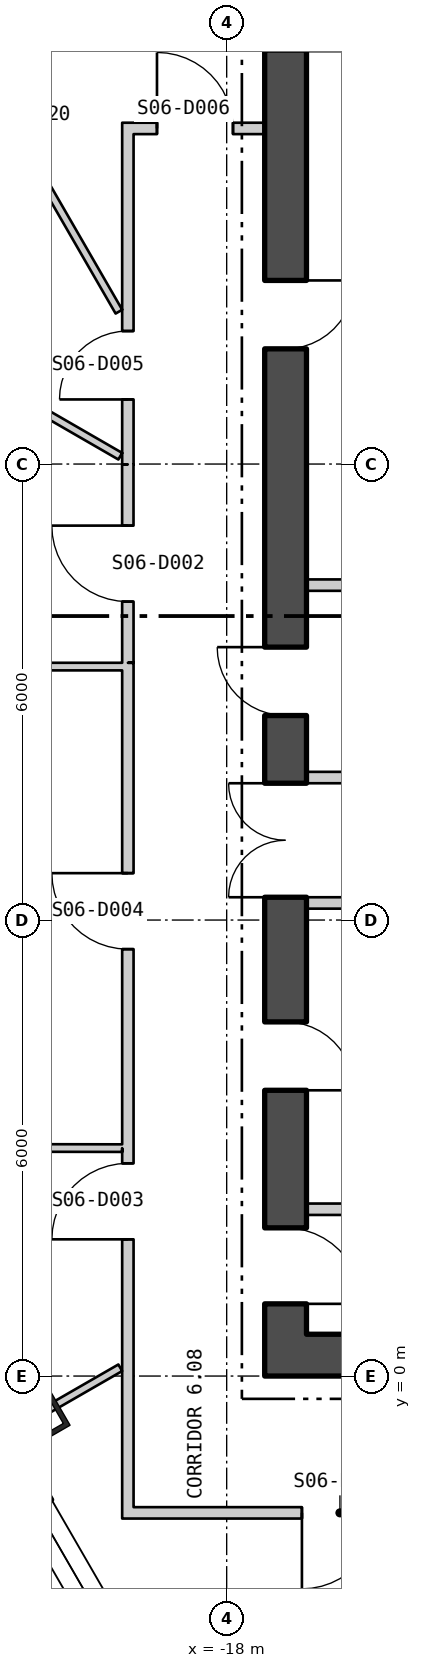
"""IFC4 building model, lengths in metres.
Left out: names, types, materials, properties, quantities, classifications, styles, units other than length and angle.
Written with IfcOpenShell. Run it as: python <this file> out.ifc"""

import sys

from ifc_helpers import new_model, si_unit, direction, frame, frame_2d, origin, origin_2d, place, context, subcontext, project, spatial, polyline, rectangle, hollow_rectangle, outline, extrude, element, fill, save


model = new_model("IFC4")
c1 = context("Model", 3, precision=1e-05, world=origin(), true_north=direction((0.0, 1.0)))
c2 = subcontext(c1, "Body", "Model", "MODEL_VIEW")
j1 = project(units=[si_unit("LENGTHUNIT", "METRE"), si_unit("PLANEANGLEUNIT", "RADIAN")], contexts=[c1])
p1 = place(None, origin())
s1 = spatial("IfcSite", under=j1, at=p1, CompositionType="ELEMENT")
p2 = place(p1, origin())
s2 = spatial("IfcBuilding", under=s1, at=p2, CompositionType="ELEMENT")
p3 = place(p2, frame((0.0, 0.0, 84.3)))
s3 = spatial("IfcBuildingStorey", under=s2, at=p3, CompositionType="ELEMENT", Elevation=84.3)
p4 = place(p3, frame((-20.526, -0.541, 0.0), z_axis=(0.0, 0.0, 1.0), x_axis=(0.5, -0.866025403784, 0.0)))
e1 = element("IfcColumn", 1, at=p4, inside=s3, PredefinedType="COLUMN", context=c2, shape_type="SweptSolid", body=[
    extrude(hollow_rectangle(XDim=0.65, YDim=0.7, WallThickness=0.065, at=origin_2d()), origin(), (0.0, 0.0, 1.0), 4.5),
])
p5 = place(p3, frame((-27.95, 11.167, -0.18), z_axis=(0.0, 0.0, 1.0), x_axis=(0.499999194392, -0.866025868902, 0.0)))
e2 = element("IfcWall", 2, at=p5, inside=s3, PredefinedType="SOLIDWALL", context=c2, shape_type="SweptSolid", body=[
    extrude(outline(polyline([(-0.13, -0.225), (45.86, -0.225), (45.6, 0.225), (0.13, 0.225), (-0.13, -0.225)])), origin(), (0.0, 0.0, 1.0), 4.28),
])
p6 = place(p5, frame((5.892, 0.0, 1.08)))
e3 = element("IfcOpeningElement", 3, at=p6, cuts=e2, PredefinedType="OPENING", context=c2, shape_type="SweptSolid", body=[
    extrude(rectangle(XDim=2.4, YDim=2.6, at=frame_2d((1.2, 1.3))), frame((0.0, 0.235, 0.0), z_axis=(0.0, -1.0, 0.0), x_axis=(1.0, 0.0, 0.0)), (0.0, 0.0, 1.0), 0.47),
])
p7 = place(p5, frame((10.399, 0.0, 1.08)))
e4 = element("IfcOpeningElement", 4, at=p7, cuts=e2, PredefinedType="OPENING", context=c2, shape_type="SweptSolid", body=[
    extrude(rectangle(XDim=2.4, YDim=2.6, at=frame_2d((1.2, 1.3))), frame((0.0, 0.235, 0.0), z_axis=(0.0, -1.0, 0.0), x_axis=(1.0, 0.0, 0.0)), (0.0, 0.0, 1.0), 0.47),
])
p8 = place(p5, frame((14.905, 0.0, 1.08)))
e5 = element("IfcOpeningElement", 5, at=p8, cuts=e2, PredefinedType="OPENING", context=c2, shape_type="SweptSolid", body=[
    extrude(rectangle(XDim=2.4, YDim=2.6, at=frame_2d((1.2, 1.3))), frame((0.0, 0.235, 0.0), z_axis=(0.0, -1.0, 0.0), x_axis=(1.0, 0.0, 0.0)), (0.0, 0.0, 1.0), 0.47),
])
p9 = place(p5, frame((19.412, 0.0, 1.08)))
e6 = element("IfcOpeningElement", 6, at=p9, cuts=e2, PredefinedType="OPENING", context=c2, shape_type="SweptSolid", body=[
    extrude(rectangle(XDim=2.4, YDim=2.6, at=frame_2d((1.2, 1.3))), frame((0.0, 0.235, 0.0), z_axis=(0.0, -1.0, 0.0), x_axis=(1.0, 0.0, 0.0)), (0.0, 0.0, 1.0), 0.47),
])
p10 = place(p5, frame((23.918, 0.0, 1.08)))
e7 = element("IfcOpeningElement", 7, at=p10, cuts=e2, PredefinedType="OPENING", context=c2, shape_type="SweptSolid", body=[
    extrude(rectangle(XDim=2.4, YDim=2.6, at=frame_2d((1.2, 1.3))), frame((0.0, 0.235, 0.0), z_axis=(0.0, -1.0, 0.0), x_axis=(1.0, 0.0, 0.0)), (0.0, 0.0, 1.0), 0.47),
])
p11 = place(p5, frame((28.425, 0.0, 1.08)))
e8 = element("IfcOpeningElement", 8, at=p11, cuts=e2, PredefinedType="OPENING", context=c2, shape_type="SweptSolid", body=[
    extrude(rectangle(XDim=2.4, YDim=2.6, at=frame_2d((1.2, 1.3))), frame((0.0, 0.235, 0.0), z_axis=(0.0, -1.0, 0.0), x_axis=(1.0, 0.0, 0.0)), (0.0, 0.0, 1.0), 0.47),
])
p12 = place(p5, frame((32.932, 0.0, 1.08)))
e9 = element("IfcOpeningElement", 9, at=p12, cuts=e2, PredefinedType="OPENING", context=c2, shape_type="SweptSolid", body=[
    extrude(rectangle(XDim=2.4, YDim=2.6, at=frame_2d((1.2, 1.3))), frame((0.0, 0.235, 0.0), z_axis=(0.0, -1.0, 0.0), x_axis=(1.0, 0.0, 0.0)), (0.0, 0.0, 1.0), 0.47),
])
p13 = place(p5, frame((37.438, 0.0, 1.08)))
e10 = element("IfcOpeningElement", 10, at=p13, cuts=e2, PredefinedType="OPENING", context=c2, shape_type="SweptSolid", body=[
    extrude(rectangle(XDim=2.4, YDim=2.6, at=frame_2d((1.2, 1.3))), frame((0.0, 0.235, 0.0), z_axis=(0.0, -1.0, 0.0), x_axis=(1.0, 0.0, 0.0)), (0.0, 0.0, 1.0), 0.47),
])
p14 = place(p5, frame((41.907, 0.0, 1.08)))
e11 = element("IfcOpeningElement", 11, at=p14, cuts=e2, PredefinedType="OPENING", context=c2, shape_type="SweptSolid", body=[
    extrude(rectangle(XDim=2.4, YDim=2.6, at=frame_2d((1.2, 1.3))), frame((0.0, 0.235, 0.0), z_axis=(0.0, -1.0, 0.0), x_axis=(1.0, 0.0, 0.0)), (0.0, 0.0, 1.0), 0.47),
])
p15 = place(p3, frame((-17.5, 0.275, 0.0), z_axis=(0.0, 0.0, 1.0), x_axis=(1.0, 0.0, 0.0)))
e12 = element("IfcWall", 12, at=p15, inside=s3, PredefinedType="SHEAR", context=c2, shape_type="SweptSolid", body=[
    extrude(rectangle(XDim=35.0, YDim=0.55, at=frame_2d((17.5, 0.0))), origin(), (0.0, 0.0, 1.0), 4.3),
])
p16 = place(p15, frame((12.0, 0.0, 0.0)))
e13 = element("IfcOpeningElement", 13, at=p16, cuts=e12, PredefinedType="OPENING", context=c2, shape_type="SweptSolid", body=[
    extrude(rectangle(XDim=1.8, YDim=2.4, at=frame_2d((0.9, 1.2))), frame((0.0, 0.285, 0.0), z_axis=(0.0, -1.0, 0.0), x_axis=(1.0, 0.0, 0.0)), (0.0, 0.0, 1.0), 0.57),
])
p17 = place(p15, frame((22.0, 0.0, 0.0)))
e14 = element("IfcOpeningElement", 14, at=p17, cuts=e12, PredefinedType="OPENING", context=c2, shape_type="SweptSolid", body=[
    extrude(rectangle(XDim=1.8, YDim=2.4, at=frame_2d((0.9, 1.2))), frame((0.0, 0.285, 0.0), z_axis=(0.0, -1.0, 0.0), x_axis=(1.0, 0.0, 0.0)), (0.0, 0.0, 1.0), 0.57),
])
p18 = place(p3, frame((-17.225, 0.55, 0.0), z_axis=(0.0, 0.0, 1.0), x_axis=(0.0, 1.0, 0.0)))
e15 = element("IfcWall", 15, at=p18, inside=s3, PredefinedType="SHEAR", context=c2, shape_type="SweptSolid", body=[
    extrude(rectangle(XDim=16.9, YDim=0.55, at=frame_2d((8.45, 0.0))), origin(), (0.0, 0.0, 1.0), 4.3),
])
p19 = place(p18, frame((5.75, 0.0, 0.0)))
e16 = element("IfcOpeningElement", 16, at=p19, cuts=e15, PredefinedType="OPENING", context=c2, shape_type="SweptSolid", body=[
    extrude(rectangle(XDim=1.5, YDim=2.1, at=frame_2d((0.75, 1.05))), frame((0.0, 0.285, 0.0), z_axis=(0.0, -1.0, 0.0), x_axis=(1.0, 0.0, 0.0)), (0.0, 0.0, 1.0), 0.57),
])
p20 = place(p18, frame((0.4, 0.0, 0.0)))
e17 = element("IfcOpeningElement", 17, at=p20, cuts=e15, PredefinedType="OPENING", context=c2, shape_type="SweptSolid", body=[
    extrude(rectangle(XDim=1.0, YDim=2.1, at=frame_2d((0.5, 1.05))), frame((0.0, 0.285, 0.0), z_axis=(0.0, -1.0, 0.0), x_axis=(1.0, 0.0, 0.0)), (0.0, 0.0, 1.0), 0.57),
])
p21 = place(p18, frame((3.21, 0.0, 0.0)))
e18 = element("IfcOpeningElement", 18, at=p21, cuts=e15, PredefinedType="OPENING", context=c2, shape_type="SweptSolid", body=[
    extrude(rectangle(XDim=0.9, YDim=2.1, at=frame_2d((0.45, 1.05))), frame((0.0, 0.285, 0.0), z_axis=(0.0, -1.0, 0.0), x_axis=(1.0, 0.0, 0.0)), (0.0, 0.0, 1.0), 0.57),
])
p22 = place(p18, frame((8.141, 0.0, 0.0)))
e19 = element("IfcOpeningElement", 19, at=p22, cuts=e15, PredefinedType="OPENING", context=c2, shape_type="SweptSolid", body=[
    extrude(rectangle(XDim=0.9, YDim=2.1, at=frame_2d((0.45, 1.05))), frame((0.0, 0.285, 0.0), z_axis=(0.0, -1.0, 0.0), x_axis=(1.0, 0.0, 0.0)), (0.0, 0.0, 1.0), 0.57),
])
p23 = place(p18, frame((12.966, 0.0, 0.0)))
e20 = element("IfcOpeningElement", 20, at=p23, cuts=e15, PredefinedType="OPENING", context=c2, shape_type="SweptSolid", body=[
    extrude(rectangle(XDim=0.9, YDim=2.1, at=frame_2d((0.45, 1.05))), frame((0.0, 0.285, 0.0), z_axis=(0.0, -1.0, 0.0), x_axis=(1.0, 0.0, 0.0)), (0.0, 0.0, 1.0), 0.57),
])
for number, where, z_axis, x_axis in (
    (21, (-16.95, 6.225, 0.0), (0.0, 0.0, 1.0), (1.0, 0.0, 0.0)),
    (22, (-16.95, 7.875, 0.0), (0.0, 0.0, 1.0), (1.0, 0.0, 0.0)),
    (23, (-16.95, 2.195, 0.0), (0.0, 0.0, 1.0), (1.0, 0.0, 0.0)),
    (24, (-16.95, 10.407, 0.0), (0.0, 0.0, 1.0), (1.0, 0.0, 0.0)),
):
    element("IfcWall", number, at=place(p3, frame(where, z_axis=z_axis, x_axis=x_axis)), inside=s3, PredefinedType="PARTITIONING", context=c2, shape_type="SweptSolid", body=[
        extrude(rectangle(XDim=2.45, YDim=0.15, at=frame_2d((1.225, 0.0))), origin(), (0.0, 0.0, 1.0), 4.3),
    ])
p24 = place(p3, frame((-26.632, 9.335, 0.0), z_axis=(0.0, 0.0, 1.0), x_axis=(1.0, 0.0, 0.0)))
e25 = element("IfcWall", 25, at=p24, inside=s3, PredefinedType="PARTITIONING", context=c2, shape_type="SweptSolid", body=[
    extrude(rectangle(XDim=7.257, YDim=0.1, at=frame_2d((3.628, 0.0))), origin(), (0.0, 0.0, 1.0), 4.3),
])
p25 = place(p3, frame((-24.823, 15.234, 0.0), z_axis=(0.0, 0.0, 1.0), x_axis=(0.866023364538, -0.500003532061, 0.0)))
e26 = element("IfcWall", 26, at=p25, inside=s3, PredefinedType="PARTITIONING", context=c2, shape_type="SweptSolid", body=[
    extrude(rectangle(XDim=6.262, YDim=0.1, at=frame_2d((3.131, 0.0))), origin(), (0.0, 0.0, 1.0), 4.3),
])
p26 = place(p3, frame((-22.68, 3.004, 0.0), z_axis=(0.0, 0.0, 1.0), x_axis=(0.99999885563, -0.001512857573, 0.0)))
e27 = element("IfcWall", 27, at=p26, inside=s3, PredefinedType="PARTITIONING", context=c2, shape_type="SweptSolid", body=[
    extrude(rectangle(XDim=3.305, YDim=0.1, at=frame_2d((1.653, 0.0))), origin(), (0.0, 0.0, 1.0), 3.8),
])
p27 = place(p3, frame((-22.406, 19.18, 0.0), z_axis=(0.0, 0.0, 1.0), x_axis=(0.500026652407, -0.866010015463, 0.0)))
e28 = element("IfcWall", 28, at=p27, inside=s3, PredefinedType="PARTITIONING", context=c2, shape_type="SweptSolid", body=[
    extrude(rectangle(XDim=5.976, YDim=0.1, at=frame_2d((2.988, 0.0))), origin(), (0.0, 0.0, 1.0), 4.3),
])
p28 = place(p3, frame((-20.44, -0.49, 0.0), z_axis=(0.0, 0.0, 1.0), x_axis=(0.866546020567, 0.499097179154, 0.0)))
e29 = element("IfcWall", 29, at=p28, inside=s3, PredefinedType="PARTITIONING", context=c2, shape_type="SweptSolid", body=[
    extrude(rectangle(XDim=1.2, YDim=0.1, at=frame_2d((0.6, 0.0))), origin(), (0.0, 0.0, 1.0), 4.3),
])
p29 = place(p3, frame((-19.375, -1.8, 0.0), z_axis=(0.0, 0.0, 1.0), x_axis=(1.0, 0.0, 0.0)))
e30 = element("IfcWall", 30, at=p29, inside=s3, PredefinedType="PARTITIONING", context=c2, shape_type="SweptSolid", body=[
    extrude(rectangle(XDim=11.69, YDim=0.15, at=frame_2d((5.845, 0.0))), origin(), (0.0, 0.0, 1.0), 4.3),
])
p30 = place(p29, frame((2.365, 0.0, 0.0)))
e31 = element("IfcOpeningElement", 31, at=p30, cuts=e30, PredefinedType="OPENING", context=c2, shape_type="SweptSolid", body=[
    extrude(rectangle(XDim=1.0, YDim=2.1, at=frame_2d((0.5, 1.05))), frame((0.0, 0.085, 0.0), z_axis=(0.0, -1.0, 0.0), x_axis=(1.0, 0.0, 0.0)), (0.0, 0.0, 1.0), 0.17),
])
p31 = place(p3, frame((-19.301, 11.995, 0.0), z_axis=(0.0, 0.0, 1.0), x_axis=(0.000383141734, -0.999999926601, 0.0)))
e32 = element("IfcWall", 32, at=p31, inside=s3, PredefinedType="PARTITIONING", context=c2, shape_type="SweptSolid", body=[
    extrude(rectangle(XDim=2.61, YDim=0.15, at=frame_2d((1.305, 0.0))), origin(), (0.0, 0.0, 1.0), 4.3),
])
p32 = place(p31, frame((0.805, 0.0, 0.0)))
e33 = element("IfcOpeningElement", 33, at=p32, cuts=e32, PredefinedType="OPENING", context=c2, shape_type="SweptSolid", body=[
    extrude(rectangle(XDim=1.0, YDim=2.1, at=frame_2d((0.5, 1.05))), frame((0.0, 0.085, 0.0), z_axis=(0.0, -1.0, 0.0), x_axis=(1.0, 0.0, 0.0)), (0.0, 0.0, 1.0), 0.17),
])
p33 = place(p3, frame((-19.3, -1.725, 0.0), z_axis=(0.0, 0.0, 1.0), x_axis=(0.0, 1.0, 0.0)))
e34 = element("IfcWall", 34, at=p33, inside=s3, PredefinedType="PARTITIONING", context=c2, shape_type="SweptSolid", body=[
    extrude(rectangle(XDim=11.11, YDim=0.15, at=frame_2d((5.555, 0.0))), origin(), (0.0, 0.0, 1.0), 4.3),
])
p34 = place(p33, frame((3.524, 0.0, 0.0)))
e35 = element("IfcOpeningElement", 35, at=p34, cuts=e34, PredefinedType="OPENING", context=c2, shape_type="SweptSolid", body=[
    extrude(rectangle(XDim=1.0, YDim=2.1, at=frame_2d((0.5, 1.05))), frame((0.0, 0.085, 0.0), z_axis=(0.0, -1.0, 0.0), x_axis=(1.0, 0.0, 0.0)), (0.0, 0.0, 1.0), 0.17),
])
p35 = place(p33, frame((7.342, 0.0, 0.0)))
e36 = element("IfcOpeningElement", 36, at=p35, cuts=e34, PredefinedType="OPENING", context=c2, shape_type="SweptSolid", body=[
    extrude(rectangle(XDim=1.0, YDim=2.1, at=frame_2d((0.5, 1.05))), frame((0.0, 0.085, 0.0), z_axis=(0.0, -1.0, 0.0), x_axis=(1.0, 0.0, 0.0)), (0.0, 0.0, 1.0), 0.17),
])
p36 = place(p3, frame((-19.3, 11.995, 0.0), z_axis=(0.0, 0.0, 1.0), x_axis=(0.0, 1.0, 0.0)))
e37 = element("IfcWall", 37, at=p36, inside=s3, PredefinedType="PARTITIONING", context=c2, shape_type="SweptSolid", body=[
    extrude(rectangle(XDim=4.496, YDim=0.15, at=frame_2d((2.248, 0.0))), origin(), (0.0, 0.0, 1.0), 4.3),
])
p37 = place(p36, frame((0.855, 0.0, 0.0)))
e38 = element("IfcOpeningElement", 38, at=p37, cuts=e37, PredefinedType="OPENING", context=c2, shape_type="SweptSolid", body=[
    extrude(rectangle(XDim=0.9, YDim=2.1, at=frame_2d((0.45, 1.05))), frame((0.0, 0.085, 0.0), z_axis=(0.0, -1.0, 0.0), x_axis=(1.0, 0.0, 0.0)), (0.0, 0.0, 1.0), 0.17),
])
p38 = place(p3, frame((-19.225, 16.416, 0.0), z_axis=(0.0, 0.0, 1.0), x_axis=(1.0, 0.0, 0.0)))
e39 = element("IfcWall", 39, at=p38, inside=s3, PredefinedType="PARTITIONING", context=c2, shape_type="SweptSolid", body=[
    extrude(rectangle(XDim=1.725, YDim=0.15, at=frame_2d((0.863, 0.0))), origin(), (0.0, 0.0, 1.0), 4.3),
])
p39 = place(p38, frame((0.308, 0.0, 0.0)))
e40 = element("IfcOpeningElement", 40, at=p39, cuts=e39, PredefinedType="OPENING", context=c2, shape_type="SweptSolid", body=[
    extrude(rectangle(XDim=1.0, YDim=2.1, at=frame_2d((0.5, 1.05))), frame((0.0, 0.085, 0.0), z_axis=(0.0, -1.0, 0.0), x_axis=(1.0, 0.0, 0.0)), (0.0, 0.0, 1.0), 0.17),
])
p40 = place(p3, frame((-18.186, -4.394, 0.0), z_axis=(0.0, 0.0, 1.0), x_axis=(0.866053278629, 0.499951716245, 0.0)))
e41 = element("IfcWall", 41, at=p40, inside=s3, PredefinedType="PARTITIONING", context=c2, shape_type="SweptSolid", body=[
    extrude(rectangle(XDim=4.909, YDim=0.15, at=frame_2d((2.454, 0.0))), origin(), (0.0, 0.0, 1.0), 4.3),
])
p41 = place(p8, origin())
e42 = element("IfcWindow", 42, at=p41, inside=s3, PartitioningType="SINGLE_PANEL", PredefinedType="WINDOW", context=c2, shape_type="SweptSolid", body=[
    extrude(rectangle(XDim=2.4, YDim=2.6, at=frame_2d((1.2, 1.3))), frame((0.0, 0.105, 0.0), z_axis=(0.0, -1.0, 0.0), x_axis=(1.0, 0.0, 0.0)), (0.0, 0.0, 1.0), 0.06),
])
fill(e5, e42)
p42 = place(p19, origin())
e43 = element("IfcDoor", 43, at=p42, inside=s3, OperationType="DOUBLE_DOOR_SINGLE_SWING", PredefinedType="DOOR", context=c2, shape_type="SweptSolid", body=[
    extrude(rectangle(XDim=1.5, YDim=2.1, at=frame_2d((0.75, 1.05))), frame((0.0, 0.025, 0.0), z_axis=(0.0, -1.0, 0.0), x_axis=(1.0, 0.0, 0.0)), (0.0, 0.0, 1.0), 0.05),
])
fill(e16, e43)
p43 = place(p20, origin())
e44 = element("IfcDoor", 44, at=p43, inside=s3, OperationType="SINGLE_SWING_LEFT", PredefinedType="DOOR", context=c2, shape_type="SweptSolid", body=[
    extrude(rectangle(XDim=1.0, YDim=2.1, at=frame_2d((0.5, 1.05))), frame((0.0, 0.025, 0.0), z_axis=(0.0, -1.0, 0.0), x_axis=(1.0, 0.0, 0.0)), (0.0, 0.0, 1.0), 0.05),
])
fill(e17, e44)
p44 = place(p21, origin())
e45 = element("IfcDoor", 45, at=p44, inside=s3, OperationType="SINGLE_SWING_LEFT", PredefinedType="DOOR", context=c2, shape_type="SweptSolid", body=[
    extrude(rectangle(XDim=0.9, YDim=2.1, at=frame_2d((0.45, 1.05))), frame((0.0, 0.025, 0.0), z_axis=(0.0, -1.0, 0.0), x_axis=(1.0, 0.0, 0.0)), (0.0, 0.0, 1.0), 0.05),
])
fill(e18, e45)
p45 = place(p22, origin())
e46 = element("IfcDoor", 46, at=p45, inside=s3, OperationType="SINGLE_SWING_LEFT", PredefinedType="DOOR", context=c2, shape_type="SweptSolid", body=[
    extrude(rectangle(XDim=0.9, YDim=2.1, at=frame_2d((0.45, 1.05))), frame((0.0, 0.025, 0.0), z_axis=(0.0, -1.0, 0.0), x_axis=(1.0, 0.0, 0.0)), (0.0, 0.0, 1.0), 0.05),
])
fill(e19, e46)
p46 = place(p23, origin())
e47 = element("IfcDoor", 47, at=p46, inside=s3, OperationType="SINGLE_SWING_RIGHT", PredefinedType="DOOR", context=c2, shape_type="SweptSolid", body=[
    extrude(rectangle(XDim=0.9, YDim=2.1, at=frame_2d((0.45, 1.05))), frame((0.0, 0.025, 0.0), z_axis=(0.0, -1.0, 0.0), x_axis=(1.0, 0.0, 0.0)), (0.0, 0.0, 1.0), 0.05),
])
fill(e20, e47)
p47 = place(p30, origin())
e48 = element("IfcDoor", 48, at=p47, inside=s3, OperationType="SINGLE_SWING_LEFT", PredefinedType="DOOR", context=c2, shape_type="SweptSolid", body=[
    extrude(rectangle(XDim=1.0, YDim=2.1, at=frame_2d((0.5, 1.05))), frame((0.0, 0.025, 0.0), z_axis=(0.0, -1.0, 0.0), x_axis=(1.0, 0.0, 0.0)), (0.0, 0.0, 1.0), 0.05),
])
fill(e31, e48)
p48 = place(p32, origin())
e49 = element("IfcDoor", 49, at=p48, inside=s3, OperationType="SINGLE_SWING_LEFT", PredefinedType="DOOR", context=c2, shape_type="SweptSolid", body=[
    extrude(rectangle(XDim=1.0, YDim=2.1, at=frame_2d((0.5, 1.05))), frame((0.0, 0.025, 0.0), z_axis=(0.0, -1.0, 0.0), x_axis=(1.0, 0.0, 0.0)), (0.0, 0.0, 1.0), 0.05),
])
fill(e33, e49)
p49 = place(p34, origin())
e50 = element("IfcDoor", 50, at=p49, inside=s3, OperationType="SINGLE_SWING_RIGHT", PredefinedType="DOOR", context=c2, shape_type="SweptSolid", body=[
    extrude(rectangle(XDim=1.0, YDim=2.1, at=frame_2d((0.5, 1.05))), frame((0.0, 0.025, 0.0), z_axis=(0.0, -1.0, 0.0), x_axis=(1.0, 0.0, 0.0)), (0.0, 0.0, 1.0), 0.05),
])
fill(e35, e50)
p50 = place(p35, origin())
e51 = element("IfcDoor", 51, at=p50, inside=s3, OperationType="SINGLE_SWING_LEFT", PredefinedType="DOOR", context=c2, shape_type="SweptSolid", body=[
    extrude(rectangle(XDim=1.0, YDim=2.1, at=frame_2d((0.5, 1.05))), frame((0.0, 0.025, 0.0), z_axis=(0.0, -1.0, 0.0), x_axis=(1.0, 0.0, 0.0)), (0.0, 0.0, 1.0), 0.05),
])
fill(e36, e51)
p51 = place(p37, origin())
e52 = element("IfcDoor", 52, at=p51, inside=s3, OperationType="SINGLE_SWING_RIGHT", PredefinedType="DOOR", context=c2, shape_type="SweptSolid", body=[
    extrude(rectangle(XDim=0.9, YDim=2.1, at=frame_2d((0.45, 1.05))), frame((0.0, 0.025, 0.0), z_axis=(0.0, -1.0, 0.0), x_axis=(1.0, 0.0, 0.0)), (0.0, 0.0, 1.0), 0.05),
])
fill(e38, e52)
p52 = place(p39, origin())
e53 = element("IfcDoor", 53, at=p52, inside=s3, OperationType="SINGLE_SWING_RIGHT", PredefinedType="DOOR", context=c2, shape_type="SweptSolid", body=[
    extrude(rectangle(XDim=1.0, YDim=2.1, at=frame_2d((0.5, 1.05))), frame((0.0, 0.025, 0.0), z_axis=(0.0, -1.0, 0.0), x_axis=(1.0, 0.0, 0.0)), (0.0, 0.0, 1.0), 0.05),
])
fill(e40, e53)
save(model, sys.argv[1])
